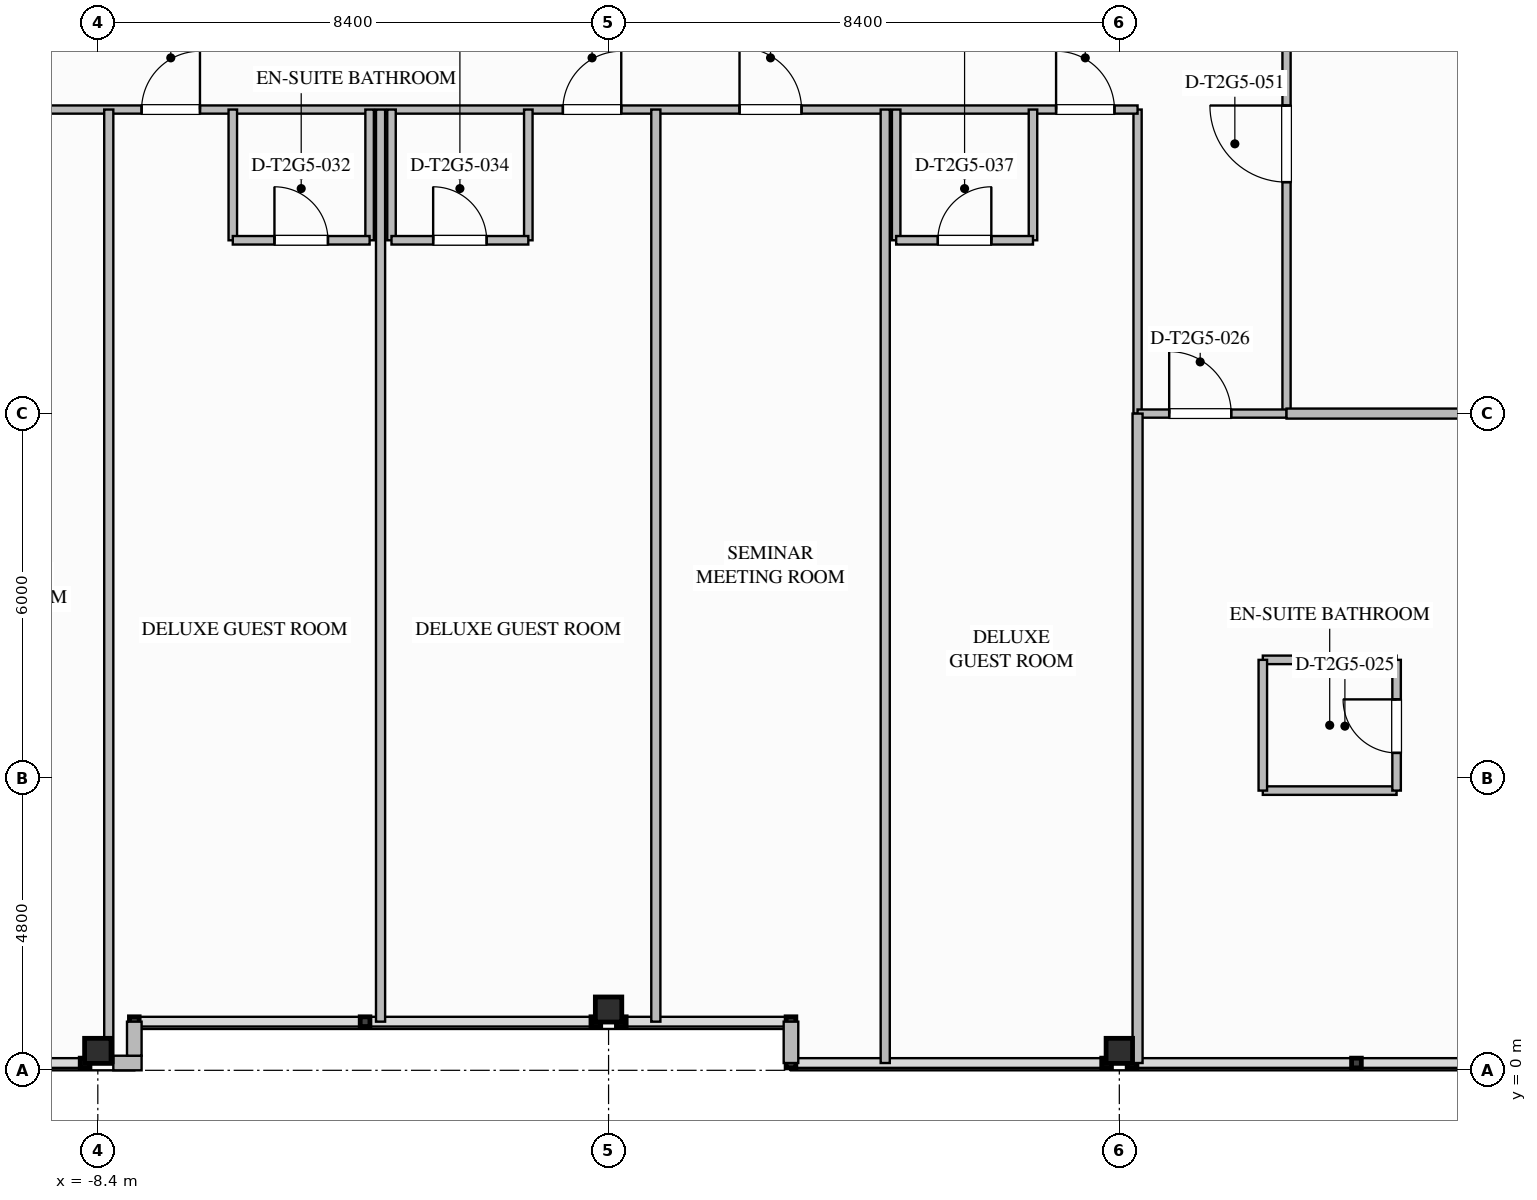
"""IFC4 building model, lengths in metres.
Left out: names, types, materials, properties, quantities, classifications, styles, units other than length and angle.
Written with IfcOpenShell. Run it as: python <this file> out.ifc"""

import sys

from ifc_helpers import new_model, si_unit, direction, frame, frame_2d, origin, origin_2d, place, context, subcontext, project, spatial, rectangle, i_section, extrude, element, fill, save


model = new_model("IFC4")
c1 = context("Model", 3, precision=1e-05, world=origin(), true_north=direction((0.0, 1.0)))
c2 = subcontext(c1, "Body", "Model", "MODEL_VIEW")
j1 = project(units=[si_unit("LENGTHUNIT", "METRE"), si_unit("PLANEANGLEUNIT", "RADIAN")], contexts=[c1])
p1 = place(None, origin())
s1 = spatial("IfcSite", under=j1, at=p1, CompositionType="ELEMENT")
p2 = place(p1, origin())
s2 = spatial("IfcBuilding", under=s1, at=p2, CompositionType="ELEMENT")
p3 = place(p2, frame((0.0, 0.0, 133.8)))
s3 = spatial("IfcBuildingStorey", under=s2, at=p3, CompositionType="ELEMENT", Elevation=133.8)
for number, where, z_axis, x_axis in (
    (1, (-8.4, 0.32, 0.0), (0.0, 0.0, 1.0), (0.0, 1.0, 0.0)),
    (2, (0.0, 1.0, 0.0), (0.0, 0.0, 1.0), (0.0, 1.0, 0.0)),
    (3, (8.4, 0.32, 0.0), (0.0, 0.0, 1.0), (0.0, 1.0, 0.0)),
):
    element("IfcColumn", number, at=place(p3, frame(where, z_axis=z_axis, x_axis=x_axis)), inside=s3, PredefinedType="COLUMN", context=c2, shape_type="SweptSolid", body=[
        extrude(i_section(OverallWidth=0.412, OverallDepth=0.435, WebThickness=0.036, FlangeThickness=0.057, FilletRadius=0.028, at=origin_2d()), origin(), (0.0, 0.0, 1.0), 3.497),
    ])
p4 = place(p3, frame((-7.68, 0.12, 0.0), z_axis=(0.0, 0.0, 1.0), x_axis=(-1.0, 0.0, 0.0)))
e4 = element("IfcWall", 4, at=p4, inside=s3, PredefinedType="STANDARD", context=c2, shape_type="SweptSolid", body=[
    extrude(rectangle(XDim=0.465, YDim=0.24, at=frame_2d((0.232, 0.0))), origin(), (0.0, 0.0, 1.0), 3.24),
])
p5 = place(p3, frame((3.0, 0.12, 0.0), z_axis=(0.0, 0.0, 1.0), x_axis=(0.0, 1.0, 0.0)))
e5 = element("IfcWall", 5, at=p5, inside=s3, PredefinedType="STANDARD", context=c2, shape_type="SweptSolid", body=[
    extrude(rectangle(XDim=0.68, YDim=0.24, at=frame_2d((0.34, 0.0))), origin(), (0.0, 0.0, 1.0), 3.24),
])
p6 = place(p3, frame((-7.8, 0.8, 0.0), z_axis=(0.0, 0.0, 1.0), x_axis=(0.0, -1.0, 0.0)))
e6 = element("IfcWall", 6, at=p6, inside=s3, PredefinedType="STANDARD", context=c2, shape_type="SweptSolid", body=[
    extrude(rectangle(XDim=0.56, YDim=0.24, at=frame_2d((0.28, 0.0))), origin(), (0.0, 0.0, 1.0), 3.24),
])
p7 = place(p3, frame((8.7, 10.8, 0.0), z_axis=(0.0, 0.0, 1.0), x_axis=(0.0, 1.0, 0.0)))
e7 = element("IfcWall", 7, at=p7, inside=s3, PredefinedType="PARTITIONING", context=c2, shape_type="SweptSolid", body=[
    extrude(rectangle(XDim=5.0, YDim=0.135, at=frame_2d((2.5, 0.0))), origin(), (0.0, 0.0, 1.0), 3.24),
])
p8 = place(p3, frame((-16.2, 15.8, 0.0), z_axis=(0.0, 0.0, 1.0), x_axis=(1.0, 0.0, 0.0)))
e8 = element("IfcWall", 8, at=p8, inside=s3, PredefinedType="PARTITIONING", context=c2, shape_type="SweptSolid", body=[
    extrude(rectangle(XDim=24.9, YDim=0.135, at=frame_2d((12.45, 0.0))), origin(), (0.0, 0.0, 1.0), 3.24),
])
p9 = place(p8, frame((0.38, 0.0, 0.0)))
e9 = element("IfcOpeningElement", 9, at=p9, cuts=e8, PredefinedType="OPENING", context=c2, shape_type="SweptSolid", body=[
    extrude(rectangle(XDim=0.96, YDim=2.15, at=frame_2d((0.48, 1.075))), frame((0.0, 0.077, 0.0), z_axis=(0.0, -1.0, 0.0), x_axis=(1.0, 0.0, 0.0)), (0.0, 0.0, 1.0), 0.155),
])
p10 = place(p8, frame((5.555, 0.0, 0.0)))
e10 = element("IfcOpeningElement", 10, at=p10, cuts=e8, PredefinedType="OPENING", context=c2, shape_type="SweptSolid", body=[
    extrude(rectangle(XDim=1.02, YDim=2.15, at=frame_2d((0.51, 1.075))), frame((0.0, 0.077, 0.0), z_axis=(0.0, -1.0, 0.0), x_axis=(1.0, 0.0, 0.0)), (0.0, 0.0, 1.0), 0.155),
])
p11 = place(p8, frame((8.52, 0.0, 0.0)))
e11 = element("IfcOpeningElement", 11, at=p11, cuts=e8, PredefinedType="OPENING", context=c2, shape_type="SweptSolid", body=[
    extrude(rectangle(XDim=0.96, YDim=2.15, at=frame_2d((0.48, 1.075))), frame((0.0, 0.077, 0.0), z_axis=(0.0, -1.0, 0.0), x_axis=(1.0, 0.0, 0.0)), (0.0, 0.0, 1.0), 0.155),
])
p12 = place(p8, frame((15.448, 0.0, 0.0)))
e12 = element("IfcOpeningElement", 12, at=p12, cuts=e8, PredefinedType="OPENING", context=c2, shape_type="SweptSolid", body=[
    extrude(rectangle(XDim=0.96, YDim=2.15, at=frame_2d((0.48, 1.075))), frame((0.0, 0.077, 0.0), z_axis=(0.0, -1.0, 0.0), x_axis=(1.0, 0.0, 0.0)), (0.0, 0.0, 1.0), 0.155),
])
p13 = place(p8, frame((18.354, 0.0, 0.0)))
e13 = element("IfcOpeningElement", 13, at=p13, cuts=e8, PredefinedType="OPENING", context=c2, shape_type="SweptSolid", body=[
    extrude(rectangle(XDim=1.02, YDim=2.15, at=frame_2d((0.51, 1.075))), frame((0.0, 0.077, 0.0), z_axis=(0.0, -1.0, 0.0), x_axis=(1.0, 0.0, 0.0)), (0.0, 0.0, 1.0), 0.155),
])
p14 = place(p8, frame((23.56, 0.0, 0.0)))
e14 = element("IfcOpeningElement", 14, at=p14, cuts=e8, PredefinedType="OPENING", context=c2, shape_type="SweptSolid", body=[
    extrude(rectangle(XDim=0.96, YDim=2.15, at=frame_2d((0.48, 1.075))), frame((0.0, 0.077, 0.0), z_axis=(0.0, -1.0, 0.0), x_axis=(1.0, 0.0, 0.0)), (0.0, 0.0, 1.0), 0.155),
])
p15 = place(p3, frame((11.15, 10.8, 0.0), z_axis=(0.0, 0.0, 1.0), x_axis=(0.0, 1.0, 0.0)))
e15 = element("IfcWall", 15, at=p15, inside=s3, PredefinedType="PARTITIONING", context=c2, shape_type="SweptSolid", body=[
    extrude(rectangle(XDim=32.4, YDim=0.135, at=frame_2d((16.2, 0.0))), origin(), (0.0, 0.0, 1.0), 3.24),
])
p16 = place(p15, frame((3.806, 0.0, 0.0)))
e16 = element("IfcOpeningElement", 16, at=p16, cuts=e15, PredefinedType="OPENING", context=c2, shape_type="SweptSolid", body=[
    extrude(rectangle(XDim=1.26, YDim=2.2, at=frame_2d((0.63, 1.1))), frame((0.0, 0.077, 0.0), z_axis=(0.0, -1.0, 0.0), x_axis=(1.0, 0.0, 0.0)), (0.0, 0.0, 1.0), 0.155),
])
p17 = place(p15, frame((15.57, 0.0, 0.0)))
e17 = element("IfcOpeningElement", 17, at=p17, cuts=e15, PredefinedType="OPENING", context=c2, shape_type="SweptSolid", body=[
    extrude(rectangle(XDim=1.26, YDim=2.2, at=frame_2d((0.63, 1.1))), frame((0.0, 0.077, 0.0), z_axis=(0.0, -1.0, 0.0), x_axis=(1.0, 0.0, 0.0)), (0.0, 0.0, 1.0), 0.155),
])
p18 = place(p15, frame((24.904, 0.0, 0.0)))
e18 = element("IfcOpeningElement", 18, at=p18, cuts=e15, PredefinedType="OPENING", context=c2, shape_type="SweptSolid", body=[
    extrude(rectangle(XDim=1.26, YDim=2.2, at=frame_2d((0.63, 1.1))), frame((0.0, 0.077, 0.0), z_axis=(0.0, -1.0, 0.0), x_axis=(1.0, 0.0, 0.0)), (0.0, 0.0, 1.0), 0.155),
])
p19 = place(p3, frame((8.7, 10.8, 0.0), z_axis=(0.0, 0.0, 1.0), x_axis=(1.0, 0.0, 0.0)))
e19 = element("IfcWall", 19, at=p19, inside=s3, PredefinedType="PARTITIONING", context=c2, shape_type="SweptSolid", body=[
    extrude(rectangle(XDim=2.45, YDim=0.135, at=frame_2d((1.225, 0.0))), origin(), (0.0, 0.0, 1.0), 2.53),
])
p20 = place(p19, frame((0.52, 0.0, 0.0)))
e20 = element("IfcOpeningElement", 20, at=p20, cuts=e19, PredefinedType="OPENING", context=c2, shape_type="SweptSolid", body=[
    extrude(rectangle(XDim=1.02, YDim=2.15, at=frame_2d((0.51, 1.075))), frame((0.0, 0.077, 0.0), z_axis=(0.0, -1.0, 0.0), x_axis=(1.0, 0.0, 0.0)), (0.0, 0.0, 1.0), 0.155),
])
p21 = place(p3, frame((8.7, 0.12, 0.0), z_axis=(0.0, 0.0, 1.0), x_axis=(0.0, 1.0, 0.0)))
e21 = element("IfcWall", 21, at=p21, inside=s3, PredefinedType="PARTITIONING", context=c2, shape_type="SweptSolid", body=[
    extrude(rectangle(XDim=10.68, YDim=0.165, at=frame_2d((5.34, 0.0))), origin(), (0.0, 0.0, 1.0), 2.53),
])
p22 = place(p3, frame((11.15, 10.8, 0.0), z_axis=(0.0, 0.0, 1.0), x_axis=(1.0, 0.0, 0.0)))
e22 = element("IfcWall", 22, at=p22, inside=s3, PredefinedType="PARTITIONING", context=c2, shape_type="SweptSolid", body=[
    extrude(rectangle(XDim=10.93, YDim=0.165, at=frame_2d((5.465, 0.0))), origin(), (0.0, 0.0, 1.0), 2.53),
])
for number, where, z_axis, x_axis in (
    (23, (10.76, 4.6, 0.0), (0.0, 0.0, 1.0), (1.0, 0.0, 0.0)),
    (24, (10.76, 6.75, 0.0), (0.0, 0.0, 1.0), (1.0, 0.0, 0.0)),
):
    element("IfcWall", number, at=place(p3, frame(where, z_axis=z_axis, x_axis=x_axis)), inside=s3, PredefinedType="PLUMBINGWALL", context=c2, shape_type="SweptSolid", body=[
        extrude(rectangle(XDim=2.2, YDim=0.14, at=frame_2d((1.1, 0.0))), origin(), (0.0, 0.0, 1.0), 3.24),
    ])
p23 = place(p3, frame((10.76, 4.6, 0.0), z_axis=(0.0, 0.0, 1.0), x_axis=(0.0, 1.0, 0.0)))
e25 = element("IfcWall", 25, at=p23, inside=s3, PredefinedType="PLUMBINGWALL", context=c2, shape_type="SweptSolid", body=[
    extrude(rectangle(XDim=2.15, YDim=0.14, at=frame_2d((1.075, 0.0))), origin(), (0.0, 0.0, 1.0), 3.24),
])
p24 = place(p3, frame((12.96, 4.6, 0.0), z_axis=(0.0, 0.0, 1.0), x_axis=(0.0, 1.0, 0.0)))
e26 = element("IfcWall", 26, at=p24, inside=s3, PredefinedType="PLUMBINGWALL", context=c2, shape_type="SweptSolid", body=[
    extrude(rectangle(XDim=2.15, YDim=0.14, at=frame_2d((1.075, 0.0))), origin(), (0.0, 0.0, 1.0), 3.24),
])
p25 = place(p24, frame((0.62, 0.0, 0.0)))
e27 = element("IfcOpeningElement", 27, at=p25, cuts=e26, PredefinedType="OPENING", context=c2, shape_type="SweptSolid", body=[
    extrude(rectangle(XDim=0.88, YDim=2.1, at=frame_2d((0.44, 1.05))), frame((0.0, 0.08, 0.0), z_axis=(0.0, -1.0, 0.0), x_axis=(1.0, 0.0, 0.0)), (0.0, 0.0, 1.0), 0.16),
])
p26 = place(p3, frame((-8.22, 0.12, 0.0), z_axis=(0.0, 0.0, 1.0), x_axis=(0.0, 1.0, 0.0)))
e28 = element("IfcWall", 28, at=p26, inside=s3, PredefinedType="PARTITIONING", context=c2, shape_type="SweptSolid", body=[
    extrude(rectangle(XDim=15.68, YDim=0.15, at=frame_2d((7.84, 0.0))), origin(), (0.0, 0.0, 1.0), 2.53),
])
for number, where, z_axis, x_axis in (
    (29, (-6.18, 15.8, 0.0), (0.0, 0.0, 1.0), (0.0, -1.0, 0.0)),
    (30, (-3.93, 15.8, 0.0), (0.0, 0.0, 1.0), (0.0, -1.0, 0.0)),
):
    element("IfcWall", number, at=place(p3, frame(where, z_axis=z_axis, x_axis=x_axis)), inside=s3, PredefinedType="PLUMBINGWALL", context=c2, shape_type="SweptSolid", body=[
        extrude(rectangle(XDim=2.15, YDim=0.14, at=frame_2d((1.075, 0.0))), origin(), (0.0, 0.0, 1.0), 3.24),
    ])
p27 = place(p3, frame((-6.18, 13.65, 0.0), z_axis=(0.0, 0.0, 1.0), x_axis=(1.0, 0.0, 0.0)))
e31 = element("IfcWall", 31, at=p27, inside=s3, PredefinedType="PLUMBINGWALL", context=c2, shape_type="SweptSolid", body=[
    extrude(rectangle(XDim=2.25, YDim=0.14, at=frame_2d((1.125, 0.0))), origin(), (0.0, 0.0, 1.0), 3.24),
])
p28 = place(p27, frame((0.685, 0.0, 0.0)))
e32 = element("IfcOpeningElement", 32, at=p28, cuts=e31, PredefinedType="OPENING", context=c2, shape_type="SweptSolid", body=[
    extrude(rectangle(XDim=0.88, YDim=2.1, at=frame_2d((0.44, 1.05))), frame((0.0, 0.08, 0.0), z_axis=(0.0, -1.0, 0.0), x_axis=(1.0, 0.0, 0.0)), (0.0, 0.0, 1.0), 0.16),
])
p29 = place(p3, frame((-3.75, 0.8, 0.0), z_axis=(0.0, 0.0, 1.0), x_axis=(0.0, 1.0, 0.0)))
e33 = element("IfcWall", 33, at=p29, inside=s3, PredefinedType="PARTITIONING", context=c2, shape_type="SweptSolid", body=[
    extrude(rectangle(XDim=15.0, YDim=0.15, at=frame_2d((7.5, 0.0))), origin(), (0.0, 0.0, 1.0), 3.24),
])
for number, where, z_axis, x_axis in (
    (34, (-3.57, 15.8, 0.0), (0.0, 0.0, 1.0), (0.0, -1.0, 0.0)),
    (35, (-1.32, 15.8, 0.0), (0.0, 0.0, 1.0), (0.0, -1.0, 0.0)),
):
    element("IfcWall", number, at=place(p3, frame(where, z_axis=z_axis, x_axis=x_axis)), inside=s3, PredefinedType="PLUMBINGWALL", context=c2, shape_type="SweptSolid", body=[
        extrude(rectangle(XDim=2.15, YDim=0.14, at=frame_2d((1.075, 0.0))), origin(), (0.0, 0.0, 1.0), 3.24),
    ])
p30 = place(p3, frame((-3.57, 13.65, 0.0), z_axis=(0.0, 0.0, 1.0), x_axis=(1.0, 0.0, 0.0)))
e36 = element("IfcWall", 36, at=p30, inside=s3, PredefinedType="PLUMBINGWALL", context=c2, shape_type="SweptSolid", body=[
    extrude(rectangle(XDim=2.25, YDim=0.14, at=frame_2d((1.125, 0.0))), origin(), (0.0, 0.0, 1.0), 3.24),
])
p31 = place(p30, frame((0.685, 0.0, 0.0)))
e37 = element("IfcOpeningElement", 37, at=p31, cuts=e36, PredefinedType="OPENING", context=c2, shape_type="SweptSolid", body=[
    extrude(rectangle(XDim=0.88, YDim=2.1, at=frame_2d((0.44, 1.05))), frame((0.0, 0.08, 0.0), z_axis=(0.0, -1.0, 0.0), x_axis=(1.0, 0.0, 0.0)), (0.0, 0.0, 1.0), 0.16),
])
p32 = place(p3, frame((0.777, 0.8, 0.0), z_axis=(0.0, 0.0, 1.0), x_axis=(0.0, 1.0, 0.0)))
e38 = element("IfcWall", 38, at=p32, inside=s3, PredefinedType="PARTITIONING", context=c2, shape_type="SweptSolid", body=[
    extrude(rectangle(XDim=15.0, YDim=0.15, at=frame_2d((7.5, 0.0))), origin(), (0.0, 0.0, 1.0), 3.24),
])
p33 = place(p3, frame((4.55, 0.12, 0.0), z_axis=(0.0, 0.0, 1.0), x_axis=(0.0, 1.0, 0.0)))
e39 = element("IfcWall", 39, at=p33, inside=s3, PredefinedType="PARTITIONING", context=c2, shape_type="SweptSolid", body=[
    extrude(rectangle(XDim=15.68, YDim=0.15, at=frame_2d((7.84, 0.0))), origin(), (0.0, 0.0, 1.0), 3.24),
])
for number, where, z_axis, x_axis in (
    (40, (4.73, 15.8, 0.0), (0.0, 0.0, 1.0), (0.0, -1.0, 0.0)),
    (41, (6.98, 15.8, 0.0), (0.0, 0.0, 1.0), (0.0, -1.0, 0.0)),
):
    element("IfcWall", number, at=place(p3, frame(where, z_axis=z_axis, x_axis=x_axis)), inside=s3, PredefinedType="PLUMBINGWALL", context=c2, shape_type="SweptSolid", body=[
        extrude(rectangle(XDim=2.15, YDim=0.14, at=frame_2d((1.075, 0.0))), origin(), (0.0, 0.0, 1.0), 3.24),
    ])
p34 = place(p3, frame((4.73, 13.65, 0.0), z_axis=(0.0, 0.0, 1.0), x_axis=(1.0, 0.0, 0.0)))
e42 = element("IfcWall", 42, at=p34, inside=s3, PredefinedType="PLUMBINGWALL", context=c2, shape_type="SweptSolid", body=[
    extrude(rectangle(XDim=2.25, YDim=0.14, at=frame_2d((1.125, 0.0))), origin(), (0.0, 0.0, 1.0), 3.24),
])
p35 = place(p34, frame((0.685, 0.0, 0.0)))
e43 = element("IfcOpeningElement", 43, at=p35, cuts=e42, PredefinedType="OPENING", context=c2, shape_type="SweptSolid", body=[
    extrude(rectangle(XDim=0.88, YDim=2.1, at=frame_2d((0.44, 1.05))), frame((0.0, 0.08, 0.0), z_axis=(0.0, -1.0, 0.0), x_axis=(1.0, 0.0, 0.0)), (0.0, 0.0, 1.0), 0.16),
])
p36 = place(p25, origin())
e44 = element("IfcDoor", 44, at=p36, inside=s3, OperationType="SINGLE_SWING_RIGHT", PredefinedType="DOOR", context=c2, shape_type="SweptSolid", body=[
    extrude(rectangle(XDim=0.88, YDim=2.1, at=frame_2d((0.44, 1.05))), frame((0.0, 0.025, 0.0), z_axis=(0.0, -1.0, 0.0), x_axis=(1.0, 0.0, 0.0)), (0.0, 0.0, 1.0), 0.05),
])
fill(e27, e44)
p37 = place(p20, origin())
e45 = element("IfcDoor", 45, at=p37, inside=s3, OperationType="SINGLE_SWING_LEFT", PredefinedType="DOOR", context=c2, shape_type="SweptSolid", body=[
    extrude(rectangle(XDim=1.02, YDim=2.15, at=frame_2d((0.51, 1.075))), frame((0.0, 0.025, 0.0), z_axis=(0.0, -1.0, 0.0), x_axis=(1.0, 0.0, 0.0)), (0.0, 0.0, 1.0), 0.05),
])
fill(e20, e45)
p38 = place(p28, origin())
e46 = element("IfcDoor", 46, at=p38, inside=s3, OperationType="SINGLE_SWING_LEFT", PredefinedType="DOOR", context=c2, shape_type="SweptSolid", body=[
    extrude(rectangle(XDim=0.88, YDim=2.1, at=frame_2d((0.44, 1.05))), frame((0.0, 0.025, 0.0), z_axis=(0.0, -1.0, 0.0), x_axis=(1.0, 0.0, 0.0)), (0.0, 0.0, 1.0), 0.05),
])
fill(e32, e46)
p39 = place(p11, origin())
e47 = element("IfcDoor", 47, at=p39, inside=s3, OperationType="SINGLE_SWING_RIGHT", PredefinedType="DOOR", context=c2, shape_type="SweptSolid", body=[
    extrude(rectangle(XDim=0.96, YDim=2.15, at=frame_2d((0.48, 1.075))), frame((0.0, 0.025, 0.0), z_axis=(0.0, -1.0, 0.0), x_axis=(1.0, 0.0, 0.0)), (0.0, 0.0, 1.0), 0.05),
])
fill(e11, e47)
p40 = place(p31, origin())
e48 = element("IfcDoor", 48, at=p40, inside=s3, OperationType="SINGLE_SWING_LEFT", PredefinedType="DOOR", context=c2, shape_type="SweptSolid", body=[
    extrude(rectangle(XDim=0.88, YDim=2.1, at=frame_2d((0.44, 1.05))), frame((0.0, 0.025, 0.0), z_axis=(0.0, -1.0, 0.0), x_axis=(1.0, 0.0, 0.0)), (0.0, 0.0, 1.0), 0.05),
])
fill(e37, e48)
p41 = place(p12, origin())
e49 = element("IfcDoor", 49, at=p41, inside=s3, OperationType="SINGLE_SWING_RIGHT", PredefinedType="DOOR", context=c2, shape_type="SweptSolid", body=[
    extrude(rectangle(XDim=0.96, YDim=2.15, at=frame_2d((0.48, 1.075))), frame((0.0, 0.025, 0.0), z_axis=(0.0, -1.0, 0.0), x_axis=(1.0, 0.0, 0.0)), (0.0, 0.0, 1.0), 0.05),
])
fill(e12, e49)
p42 = place(p13, origin())
e50 = element("IfcDoor", 50, at=p42, inside=s3, OperationType="SINGLE_SWING_LEFT", PredefinedType="DOOR", context=c2, shape_type="SweptSolid", body=[
    extrude(rectangle(XDim=1.02, YDim=2.15, at=frame_2d((0.51, 1.075))), frame((0.0, 0.025, 0.0), z_axis=(0.0, -1.0, 0.0), x_axis=(1.0, 0.0, 0.0)), (0.0, 0.0, 1.0), 0.05),
])
fill(e13, e50)
p43 = place(p35, origin())
e51 = element("IfcDoor", 51, at=p43, inside=s3, OperationType="SINGLE_SWING_RIGHT", PredefinedType="DOOR", context=c2, shape_type="SweptSolid", body=[
    extrude(rectangle(XDim=0.88, YDim=2.1, at=frame_2d((0.44, 1.05))), frame((0.0, 0.025, 0.0), z_axis=(0.0, -1.0, 0.0), x_axis=(1.0, 0.0, 0.0)), (0.0, 0.0, 1.0), 0.05),
])
fill(e43, e51)
p44 = place(p14, origin())
e52 = element("IfcDoor", 52, at=p44, inside=s3, OperationType="SINGLE_SWING_LEFT", PredefinedType="DOOR", context=c2, shape_type="SweptSolid", body=[
    extrude(rectangle(XDim=0.96, YDim=2.15, at=frame_2d((0.48, 1.075))), frame((0.0, 0.025, 0.0), z_axis=(0.0, -1.0, 0.0), x_axis=(1.0, 0.0, 0.0)), (0.0, 0.0, 1.0), 0.05),
])
fill(e14, e52)
p45 = place(p16, origin())
e53 = element("IfcDoor", 53, at=p45, inside=s3, OperationType="SINGLE_SWING_RIGHT", PredefinedType="DOOR", context=c2, shape_type="SweptSolid", body=[
    extrude(rectangle(XDim=1.26, YDim=2.2, at=frame_2d((0.63, 1.1))), frame((0.0, 0.025, 0.0), z_axis=(0.0, -1.0, 0.0), x_axis=(1.0, 0.0, 0.0)), (0.0, 0.0, 1.0), 0.05),
])
fill(e16, e53)
save(model, sys.argv[1])
